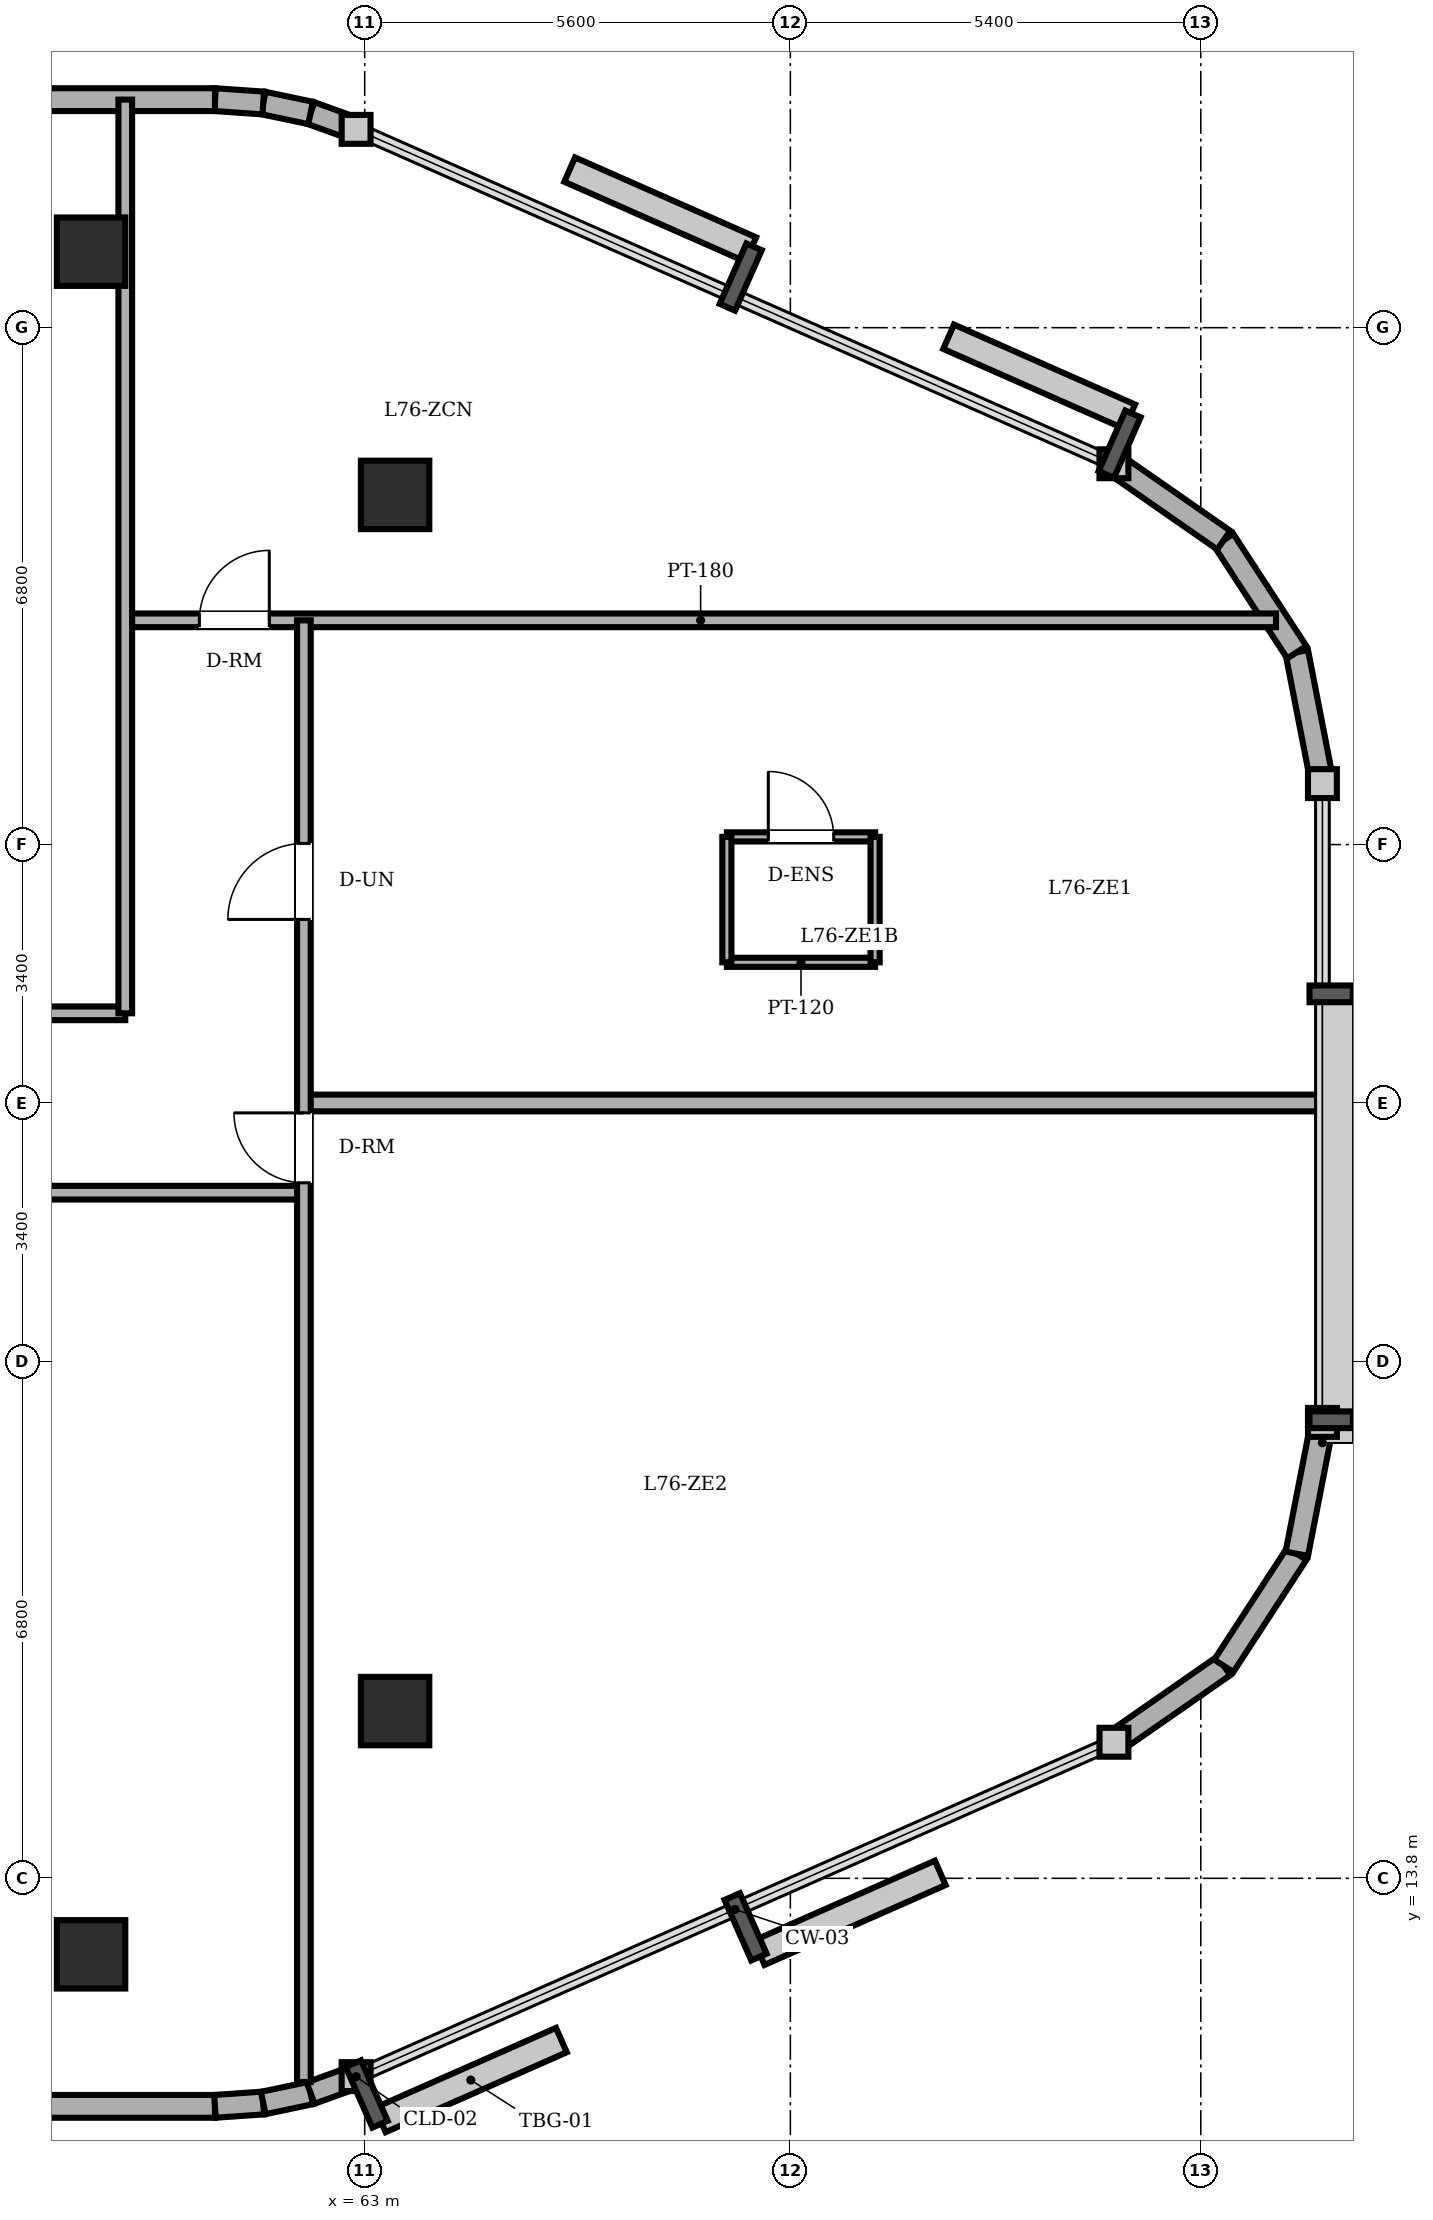
"""IFC4 building model, lengths in metres.
Left out: names, types, materials, properties, quantities, classifications, styles, units other than length and angle.
Written with IfcOpenShell. Run it as: python <this file> out.ifc"""

import sys

from ifc_helpers import new_model, si_unit, direction, frame, frame_2d, origin, origin_2d, place, context, subcontext, project, spatial, rectangle, circle, extrude, element, fill, save


model = new_model("IFC4")
c1 = context("Model", 3, precision=1e-05, world=origin(), true_north=direction((0.0, 1.0)))
c2 = subcontext(c1, "Body", "Model", "MODEL_VIEW")
j1 = project(units=[si_unit("LENGTHUNIT", "METRE"), si_unit("PLANEANGLEUNIT", "RADIAN")], contexts=[c1])
p1 = place(None, origin())
s1 = spatial("IfcSite", under=j1, at=p1, CompositionType="ELEMENT")
p2 = place(p1, origin())
s2 = spatial("IfcBuilding", under=s1, at=p2, CompositionType="ELEMENT")
p3 = place(p2, frame((0.0, 0.0, 291.65)))
s3 = spatial("IfcBuildingStorey", under=s2, at=p3, CompositionType="ELEMENT", Elevation=291.65)
for number, where, z_axis, x_axis in (
    (1, (59.4, 12.8, 0.0), (0.0, 0.0, 1.0), (1.0, 0.0, 0.0)),
    (2, (63.4, 16.0, 0.0), (0.0, 0.0, 1.0), (1.0, 0.0, 0.0)),
    (3, (63.4, 32.0, 0.0), (0.0, 0.0, 1.0), (1.0, 0.0, 0.0)),
    (4, (59.4, 35.2, 0.0), (0.0, 0.0, 1.0), (1.0, 0.0, 0.0)),
):
    element("IfcColumn", number, at=place(p3, frame(where, z_axis=z_axis, x_axis=x_axis)), inside=s3, PredefinedType="COLUMN", context=c2, shape_type="SweptSolid", body=[
        extrude(circle(Radius=0.45, at=origin_2d()), origin(), (0.0, 0.0, 1.0), 3.65),
    ])
p4 = place(p3, frame((24.0, 10.8, 0.0), z_axis=(0.0, 0.0, 1.0), x_axis=(1.0, 0.0, 0.0)))
e5 = element("IfcWall", 5, at=p4, inside=s3, PredefinedType="SOLIDWALL", context=c2, shape_type="SweptSolid", body=[
    extrude(rectangle(XDim=37.03, YDim=0.3, at=frame_2d((18.515, 0.0))), origin(), (0.0, 0.0, 1.0), 3.41),
])
p5 = place(p4, frame((7.925, 0.0, 0.0)))
e6 = element("IfcOpeningElement", 6, at=p5, cuts=e5, PredefinedType="OPENING", context=c2, shape_type="SweptSolid", body=[
    extrude(rectangle(XDim=0.95, YDim=2.2, at=frame_2d((0.475, 1.1))), frame((0.0, 0.16, 0.0), z_axis=(0.0, -1.0, 0.0), x_axis=(1.0, 0.0, 0.0)), (0.0, 0.0, 1.0), 0.32),
])
p6 = place(p4, frame((4.917, 0.0, 0.85)))
e7 = element("IfcOpeningElement", 7, at=p6, cuts=e5, PredefinedType="OPENING", context=c2, shape_type="SweptSolid", body=[
    extrude(rectangle(XDim=1.2, YDim=1.6, at=frame_2d((0.6, 0.8))), frame((0.0, 0.16, 0.0), z_axis=(0.0, -1.0, 0.0), x_axis=(1.0, 0.0, 0.0)), (0.0, 0.0, 1.0), 0.32),
])
p7 = place(p4, frame((10.083, 0.0, 0.85)))
e8 = element("IfcOpeningElement", 8, at=p7, cuts=e5, PredefinedType="OPENING", context=c2, shape_type="SweptSolid", body=[
    extrude(rectangle(XDim=1.2, YDim=1.6, at=frame_2d((0.6, 0.8))), frame((0.0, 0.16, 0.0), z_axis=(0.0, -1.0, 0.0), x_axis=(1.0, 0.0, 0.0)), (0.0, 0.0, 1.0), 0.32),
])
p8 = place(p4, frame((22.193, 0.0, 0.85)))
e9 = element("IfcOpeningElement", 9, at=p8, cuts=e5, PredefinedType="OPENING", context=c2, shape_type="SweptSolid", body=[
    extrude(rectangle(XDim=1.2, YDim=1.6, at=frame_2d((0.6, 0.8))), frame((0.0, 0.16, 0.0), z_axis=(0.0, -1.0, 0.0), x_axis=(1.0, 0.0, 0.0)), (0.0, 0.0, 1.0), 0.32),
])
p9 = place(p4, frame((29.137, 0.0, 0.85)))
e10 = element("IfcOpeningElement", 10, at=p9, cuts=e5, PredefinedType="OPENING", context=c2, shape_type="SweptSolid", body=[
    extrude(rectangle(XDim=1.2, YDim=1.6, at=frame_2d((0.6, 0.8))), frame((0.0, 0.16, 0.0), z_axis=(0.0, -1.0, 0.0), x_axis=(1.0, 0.0, 0.0)), (0.0, 0.0, 1.0), 0.32),
])
p10 = place(p3, frame((61.03, 10.8, 0.0), z_axis=(0.0, 0.0, 1.0), x_axis=(0.997613959688, 0.069039028352, 0.0)))
e11 = element("IfcWall", 11, at=p10, inside=s3, PredefinedType="SOLIDWALL", context=c2, shape_type="SweptSolid", body=[
    extrude(rectangle(XDim=0.636, YDim=0.3, at=frame_2d((0.318, 0.0))), origin(), (0.0, 0.0, 1.0), 3.41),
])
p11 = place(p3, frame((61.665, 10.844, 0.0), z_axis=(0.0, 0.0, 1.0), x_axis=(0.97857012251, 0.205913854149, 0.0)))
e12 = element("IfcWall", 12, at=p11, inside=s3, PredefinedType="SOLIDWALL", context=c2, shape_type="SweptSolid", body=[
    extrude(rectangle(XDim=0.637, YDim=0.3, at=frame_2d((0.318, 0.0))), origin(), (0.0, 0.0, 1.0), 3.41),
])
p12 = place(p3, frame((62.288, 10.975, 0.0), z_axis=(0.0, 0.0, 1.0), x_axis=(0.94077491148, 0.339031806665, 0.0)))
e13 = element("IfcWall", 13, at=p12, inside=s3, PredefinedType="SOLIDWALL", context=c2, shape_type="SweptSolid", body=[
    extrude(rectangle(XDim=0.636, YDim=0.3, at=frame_2d((0.318, 0.0))), origin(), (0.0, 0.0, 1.0), 3.41),
])
p13 = place(p3, frame((72.857, 15.59, 0.0), z_axis=(0.0, 0.0, 1.0), x_axis=(0.821006966142, 0.570918174124, 0.0)))
e14 = element("IfcWall", 14, at=p13, inside=s3, PredefinedType="SOLIDWALL", context=c2, shape_type="SweptSolid", body=[
    extrude(rectangle(XDim=1.76, YDim=0.3, at=frame_2d((0.88, 0.0))), origin(), (0.0, 0.0, 1.0), 3.41),
])
for number, where, z_axis, x_axis in (
    (15, (74.302, 16.595, 0.0), (0.0, 0.0, 1.0), (0.546, 0.838, 0.0)),
    (16, (75.263, 18.07, 0.0), (0.0, 0.0, 1.0), (0.192, 0.981, 0.0)),
    (17, (75.6, 28.202, 0.0), (0.0, 0.0, 1.0), (-0.192, 0.981, 0.0)),
    (18, (75.263, 29.93, 0.0), (0.0, 0.0, 1.0), (-0.546, 0.838, 0.0)),
):
    element("IfcWall", number, at=place(p3, frame(where, z_axis=z_axis, x_axis=x_axis)), inside=s3, PredefinedType="SOLIDWALL", context=c2, shape_type="SweptSolid", body=[
        extrude(rectangle(XDim=1.76, YDim=0.3, at=frame_2d((0.88, 0.0))), origin(), (0.0, 0.0, 1.0), 3.41),
    ])
p14 = place(p3, frame((74.302, 31.405, 0.0), z_axis=(0.0, 0.0, 1.0), x_axis=(-0.821006966142, 0.570918174124, 0.0)))
e19 = element("IfcWall", 19, at=p14, inside=s3, PredefinedType="SOLIDWALL", context=c2, shape_type="SweptSolid", body=[
    extrude(rectangle(XDim=1.76, YDim=0.3, at=frame_2d((0.88, 0.0))), origin(), (0.0, 0.0, 1.0), 3.41),
])
p15 = place(p3, frame((62.887, 36.809, 0.0), z_axis=(0.0, 0.0, 1.0), x_axis=(-0.94077491148, 0.339031806665, 0.0)))
e20 = element("IfcWall", 20, at=p15, inside=s3, PredefinedType="SOLIDWALL", context=c2, shape_type="SweptSolid", body=[
    extrude(rectangle(XDim=0.636, YDim=0.3, at=frame_2d((0.318, 0.0))), origin(), (0.0, 0.0, 1.0), 3.41),
])
p16 = place(p3, frame((62.288, 37.025, 0.0), z_axis=(0.0, 0.0, 1.0), x_axis=(-0.97857012251, 0.205913854149, 0.0)))
e21 = element("IfcWall", 21, at=p16, inside=s3, PredefinedType="SOLIDWALL", context=c2, shape_type="SweptSolid", body=[
    extrude(rectangle(XDim=0.637, YDim=0.3, at=frame_2d((0.318, 0.0))), origin(), (0.0, 0.0, 1.0), 3.41),
])
p17 = place(p3, frame((61.665, 37.156, 0.0), z_axis=(0.0, 0.0, 1.0), x_axis=(-0.997613959688, 0.069039028352, 0.0)))
e22 = element("IfcWall", 22, at=p17, inside=s3, PredefinedType="SOLIDWALL", context=c2, shape_type="SweptSolid", body=[
    extrude(rectangle(XDim=0.636, YDim=0.3, at=frame_2d((0.318, 0.0))), origin(), (0.0, 0.0, 1.0), 3.41),
])
p18 = place(p3, frame((61.03, 37.2, 0.0), z_axis=(0.0, 0.0, 1.0), x_axis=(-1.0, 0.0, 0.0)))
e23 = element("IfcWall", 23, at=p18, inside=s3, PredefinedType="SOLIDWALL", context=c2, shape_type="SweptSolid", body=[
    extrude(rectangle(XDim=37.03, YDim=0.3, at=frame_2d((18.515, 0.0))), origin(), (0.0, 0.0, 1.0), 3.41),
])
p19 = place(p18, frame((31.155, 0.0, 0.0)))
e24 = element("IfcOpeningElement", 24, at=p19, cuts=e23, PredefinedType="OPENING", context=c2, shape_type="SweptSolid", body=[
    extrude(rectangle(XDim=0.95, YDim=2.2, at=frame_2d((0.475, 1.1))), frame((0.0, 0.16, 0.0), z_axis=(0.0, -1.0, 0.0), x_axis=(1.0, 0.0, 0.0)), (0.0, 0.0, 1.0), 0.32),
])
p20 = place(p18, frame((7.247, 0.0, 0.85)))
e25 = element("IfcOpeningElement", 25, at=p20, cuts=e23, PredefinedType="OPENING", context=c2, shape_type="SweptSolid", body=[
    extrude(rectangle(XDim=1.2, YDim=1.6, at=frame_2d((0.6, 0.8))), frame((0.0, 0.16, 0.0), z_axis=(0.0, -1.0, 0.0), x_axis=(1.0, 0.0, 0.0)), (0.0, 0.0, 1.0), 0.32),
])
p21 = place(p18, frame((13.913, 0.0, 0.85)))
e26 = element("IfcOpeningElement", 26, at=p21, cuts=e23, PredefinedType="OPENING", context=c2, shape_type="SweptSolid", body=[
    extrude(rectangle(XDim=1.2, YDim=1.6, at=frame_2d((0.6, 0.8))), frame((0.0, 0.16, 0.0), z_axis=(0.0, -1.0, 0.0), x_axis=(1.0, 0.0, 0.0)), (0.0, 0.0, 1.0), 0.32),
])
p22 = place(p18, frame((25.747, 0.0, 0.85)))
e27 = element("IfcOpeningElement", 27, at=p22, cuts=e23, PredefinedType="OPENING", context=c2, shape_type="SweptSolid", body=[
    extrude(rectangle(XDim=1.2, YDim=1.6, at=frame_2d((0.6, 0.8))), frame((0.0, 0.16, 0.0), z_axis=(0.0, -1.0, 0.0), x_axis=(1.0, 0.0, 0.0)), (0.0, 0.0, 1.0), 0.32),
])
p23 = place(p3, frame((67.765, 27.501, 0.0), z_axis=(0.0, 0.0, 1.0), x_axis=(1.0, 0.0, 0.0)))
e28 = element("IfcWall", 28, at=p23, inside=s3, PredefinedType="PARTITIONING", context=c2, shape_type="SweptSolid", body=[
    extrude(rectangle(XDim=1.95, YDim=0.12, at=frame_2d((0.975, 0.0))), origin(), (0.0, 0.0, 1.0), 3.41),
])
p24 = place(p23, frame((0.545, 0.0, 0.0)))
e29 = element("IfcOpeningElement", 29, at=p24, cuts=e28, PredefinedType="OPENING", context=c2, shape_type="SweptSolid", body=[
    extrude(rectangle(XDim=0.86, YDim=2.1, at=frame_2d((0.43, 1.05))), frame((0.0, 0.07, 0.0), z_axis=(0.0, -1.0, 0.0), x_axis=(1.0, 0.0, 0.0)), (0.0, 0.0, 1.0), 0.14),
])
p25 = place(p3, frame((69.715, 25.851, 0.0), z_axis=(0.0, 0.0, 1.0), x_axis=(-1.0, 0.0, 0.0)))
e30 = element("IfcWall", 30, at=p25, inside=s3, PredefinedType="PARTITIONING", context=c2, shape_type="SweptSolid", body=[
    extrude(rectangle(XDim=1.95, YDim=0.12, at=frame_2d((0.975, 0.0))), origin(), (0.0, 0.0, 1.0), 3.41),
])
for number, where, z_axis, x_axis in (
    (31, (67.765, 27.501, 0.0), (0.0, 0.0, 1.0), (0.0, -1.0, 0.0)),
    (32, (69.715, 25.851, 0.0), (0.0, 0.0, 1.0), (0.0, 1.0, 0.0)),
):
    element("IfcWall", number, at=place(p3, frame(where, z_axis=z_axis, x_axis=x_axis)), inside=s3, PredefinedType="PARTITIONING", context=c2, shape_type="SweptSolid", body=[
        extrude(rectangle(XDim=1.65, YDim=0.12, at=frame_2d((0.825, 0.0))), origin(), (0.0, 0.0, 1.0), 3.41),
    ])
p26 = place(p3, frame((39.85, 22.82, 0.0), z_axis=(0.0, 0.0, 1.0), x_axis=(1.0, 0.0, 0.0)))
e33 = element("IfcWall", 33, at=p26, inside=s3, PredefinedType="PARTITIONING", context=c2, shape_type="SweptSolid", body=[
    extrude(rectangle(XDim=22.35, YDim=0.18, at=frame_2d((11.175, 0.0))), origin(), (0.0, 0.0, 1.0), 3.41),
])
p27 = place(p26, frame((10.715, 0.0, 0.0)))
e34 = element("IfcOpeningElement", 34, at=p27, cuts=e33, PredefinedType="OPENING", context=c2, shape_type="SweptSolid", body=[
    extrude(rectangle(XDim=0.92, YDim=2.1, at=frame_2d((0.46, 1.05))), frame((0.0, 0.1, 0.0), z_axis=(0.0, -1.0, 0.0), x_axis=(1.0, 0.0, 0.0)), (0.0, 0.0, 1.0), 0.2),
])
p28 = place(p3, frame((62.2, 24.0, 0.0), z_axis=(0.0, 0.0, 1.0), x_axis=(1.0, 0.0, 0.0)))
e35 = element("IfcWall", 35, at=p28, inside=s3, PredefinedType="PARTITIONING", context=c2, shape_type="SweptSolid", body=[
    extrude(rectangle(XDim=13.4, YDim=0.22, at=frame_2d((6.7, 0.0))), origin(), (0.0, 0.0, 1.0), 3.192),
])
p29 = place(p3, frame((39.85, 25.18, 0.0), z_axis=(0.0, 0.0, 1.0), x_axis=(1.0, 0.0, 0.0)))
e36 = element("IfcWall", 36, at=p29, inside=s3, PredefinedType="PARTITIONING", context=c2, shape_type="SweptSolid", body=[
    extrude(rectangle(XDim=20.0, YDim=0.18, at=frame_2d((10.0, 0.0))), origin(), (0.0, 0.0, 1.0), 3.41),
])
p30 = place(p29, frame((9.54, 0.0, 0.0)))
e37 = element("IfcOpeningElement", 37, at=p30, cuts=e36, PredefinedType="OPENING", context=c2, shape_type="SweptSolid", body=[
    extrude(rectangle(XDim=0.92, YDim=2.1, at=frame_2d((0.46, 1.05))), frame((0.0, 0.1, 0.0), z_axis=(0.0, -1.0, 0.0), x_axis=(1.0, 0.0, 0.0)), (0.0, 0.0, 1.0), 0.2),
])
p31 = place(p3, frame((59.85, 30.35, 0.0), z_axis=(0.0, 0.0, 1.0), x_axis=(1.0, 0.0, 0.0)))
e38 = element("IfcWall", 38, at=p31, inside=s3, PredefinedType="PARTITIONING", context=c2, shape_type="SweptSolid", body=[
    extrude(rectangle(XDim=15.139, YDim=0.18, at=frame_2d((7.569, 0.0))), origin(), (0.0, 0.0, 1.0), 3.41),
])
p32 = place(p31, frame((0.975, 0.0, 0.0)))
e39 = element("IfcOpeningElement", 39, at=p32, cuts=e38, PredefinedType="OPENING", context=c2, shape_type="SweptSolid", body=[
    extrude(rectangle(XDim=0.92, YDim=2.1, at=frame_2d((0.46, 1.05))), frame((0.0, 0.1, 0.0), z_axis=(0.0, -1.0, 0.0), x_axis=(1.0, 0.0, 0.0)), (0.0, 0.0, 1.0), 0.2),
])
p33 = place(p3, frame((59.85, 25.18, 0.0), z_axis=(0.0, 0.0, 1.0), x_axis=(0.0, 1.0, 0.0)))
e40 = element("IfcWall", 40, at=p33, inside=s3, PredefinedType="PARTITIONING", context=c2, shape_type="SweptSolid", body=[
    extrude(rectangle(XDim=12.02, YDim=0.18, at=frame_2d((6.01, 0.0))), origin(), (0.0, 0.0, 1.0), 3.41),
])
p34 = place(p3, frame((62.2, 11.12, 0.0), z_axis=(0.0, 0.0, 1.0), x_axis=(0.0, 1.0, 0.0)))
e41 = element("IfcWall", 41, at=p34, inside=s3, PredefinedType="PARTITIONING", context=c2, shape_type="SweptSolid", body=[
    extrude(rectangle(XDim=19.23, YDim=0.18, at=frame_2d((9.615, 0.0))), origin(), (0.0, 0.0, 1.0), 3.41),
])
p35 = place(p34, frame((15.295, 0.0, 0.0)))
e42 = element("IfcOpeningElement", 42, at=p35, cuts=e41, PredefinedType="OPENING", context=c2, shape_type="SweptSolid", body=[
    extrude(rectangle(XDim=1.0, YDim=2.15, at=frame_2d((0.5, 1.075))), frame((0.0, 0.1, 0.0), z_axis=(0.0, -1.0, 0.0), x_axis=(1.0, 0.0, 0.0)), (0.0, 0.0, 1.0), 0.2),
])
p36 = place(p34, frame((11.83, 0.0, 0.0)))
e43 = element("IfcOpeningElement", 43, at=p36, cuts=e41, PredefinedType="OPENING", context=c2, shape_type="SweptSolid", body=[
    extrude(rectangle(XDim=0.92, YDim=2.1, at=frame_2d((0.46, 1.05))), frame((0.0, 0.1, 0.0), z_axis=(0.0, -1.0, 0.0), x_axis=(1.0, 0.0, 0.0)), (0.0, 0.0, 1.0), 0.2),
])
p37 = place(p24, origin())
e44 = element("IfcDoor", 44, at=p37, inside=s3, OperationType="SINGLE_SWING_LEFT", PredefinedType="DOOR", context=c2, shape_type="SweptSolid", body=[
    extrude(rectangle(XDim=0.86, YDim=2.1, at=frame_2d((0.43, 1.05))), frame((0.0, 0.025, 0.0), z_axis=(0.0, -1.0, 0.0), x_axis=(1.0, 0.0, 0.0)), (0.0, 0.0, 1.0), 0.05),
])
fill(e29, e44)
p38 = place(p32, origin())
e45 = element("IfcDoor", 45, at=p38, inside=s3, OperationType="SINGLE_SWING_RIGHT", PredefinedType="DOOR", context=c2, shape_type="SweptSolid", body=[
    extrude(rectangle(XDim=0.92, YDim=2.1, at=frame_2d((0.46, 1.05))), frame((0.0, 0.025, 0.0), z_axis=(0.0, -1.0, 0.0), x_axis=(1.0, 0.0, 0.0)), (0.0, 0.0, 1.0), 0.05),
])
fill(e39, e45)
p39 = place(p35, origin())
e46 = element("IfcDoor", 46, at=p39, inside=s3, OperationType="SINGLE_SWING_LEFT", PredefinedType="DOOR", context=c2, shape_type="SweptSolid", body=[
    extrude(rectangle(XDim=1.0, YDim=2.15, at=frame_2d((0.5, 1.075))), frame((0.0, 0.025, 0.0), z_axis=(0.0, -1.0, 0.0), x_axis=(1.0, 0.0, 0.0)), (0.0, 0.0, 1.0), 0.05),
])
fill(e42, e46)
p40 = place(p36, origin())
e47 = element("IfcDoor", 47, at=p40, inside=s3, OperationType="SINGLE_SWING_RIGHT", PredefinedType="DOOR", context=c2, shape_type="SweptSolid", body=[
    extrude(rectangle(XDim=0.92, YDim=2.1, at=frame_2d((0.46, 1.05))), frame((0.0, 0.025, 0.0), z_axis=(0.0, -1.0, 0.0), x_axis=(1.0, 0.0, 0.0)), (0.0, 0.0, 1.0), 0.05),
])
fill(e43, e47)
save(model, sys.argv[1])
